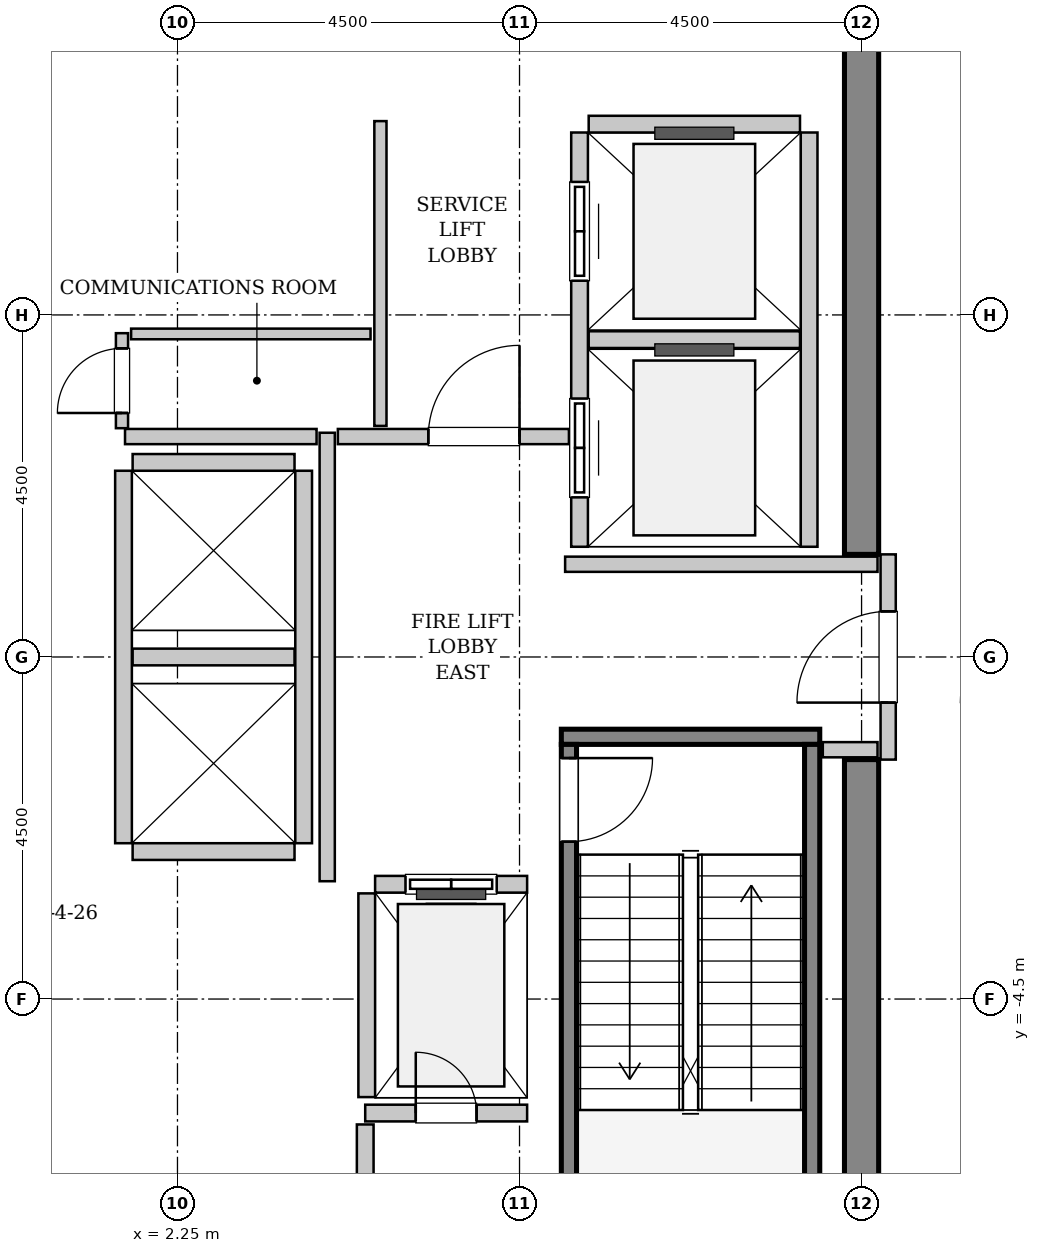
"""IFC4 building model, lengths in metres.
Left out: names, types, materials, properties, quantities, classifications, styles, units other than length and angle.
Written with IfcOpenShell. Run it as: python <this file> out.ifc"""

import sys

from ifc_helpers import new_model, si_unit, direction, frame, frame_2d, origin, place, context, subcontext, project, spatial, rectangle, extrude, source, transform, mapped, element, fill, save


model = new_model("IFC4")
c1 = context("Model", 3, precision=1e-05, world=origin(), true_north=direction((0.0, 1.0)))
c2 = subcontext(c1, "Body", "Model", "MODEL_VIEW")
j1 = project(units=[si_unit("LENGTHUNIT", "METRE"), si_unit("PLANEANGLEUNIT", "RADIAN")], contexts=[c1])
p1 = place(None, origin())
s1 = spatial("IfcSite", under=j1, at=p1, CompositionType="ELEMENT")
p2 = place(p1, origin())
s2 = spatial("IfcBuilding", under=s1, at=p2, CompositionType="ELEMENT")
p3 = place(p2, frame((0.0, 0.0, 317.8)))
s3 = spatial("IfcBuildingStorey", under=s2, at=p3, CompositionType="ELEMENT", Elevation=317.8)
m1 = source(origin(), c2, "Body", "SweptSolid", [
    extrude(rectangle(XDim=7.425, YDim=0.45, at=frame_2d((3.712, 0.0))), origin(), (0.0, 0.0, 1.0), 4.6),
])
for number, where, z_axis, x_axis in (
    (1, (11.25, -8.775, 0.0), (0.0, 0.0, 1.0), (0.0, 1.0, 0.0)),
    (2, (11.25, 1.35, 0.0), (0.0, 0.0, 1.0), (0.0, 1.0, 0.0)),
):
    element("IfcWall", number, at=place(p3, frame(where, z_axis=z_axis, x_axis=x_axis)), inside=s3, PredefinedType="SHEAR", context=c2, shape_type="MappedRepresentation", body=[
        mapped(m1, transform((0.0, 0.0, 0.0), x_axis=(1.0, 0.0, 0.0), y_axis=(0.0, 1.0, 0.0), z_axis=(0.0, 0.0, 1.0), scale=1.0)),
    ])
m2 = source(origin(), c2, "Body", "SweptSolid", [
    extrude(rectangle(XDim=3.4, YDim=0.2, at=frame_2d((1.7, 0.0))), origin(), (0.0, 0.0, 1.0), 4.6),
])
p4 = place(p3, frame((7.3, -1.05, 0.0), z_axis=(0.0, 0.0, 1.0), x_axis=(1.0, 0.0, 0.0)))
e3 = element("IfcWall", 3, at=p4, inside=s3, PredefinedType="SOLIDWALL", context=c2, shape_type="MappedRepresentation", body=[
    mapped(m2, transform((0.0, 0.0, 0.0), x_axis=(1.0, 0.0, 0.0), y_axis=(0.0, 1.0, 0.0), z_axis=(0.0, 0.0, 1.0), scale=1.0)),
])
m3 = source(origin(), c2, "Body", "SweptSolid", [
    extrude(rectangle(XDim=7.1, YDim=0.2, at=frame_2d((3.55, 0.0))), origin(), (0.0, 0.0, 1.0), 4.6),
])
p5 = place(p3, frame((7.4, -1.15, 0.0), z_axis=(0.0, 0.0, 1.0), x_axis=(0.0, -1.0, 0.0)))
e4 = element("IfcWall", 4, at=p5, inside=s3, PredefinedType="SOLIDWALL", context=c2, shape_type="MappedRepresentation", body=[
    mapped(m3, transform((0.0, 0.0, 0.0), x_axis=(1.0, 0.0, 0.0), y_axis=(0.0, 1.0, 0.0), z_axis=(0.0, 0.0, 1.0), scale=1.0)),
])
p6 = place(p5, frame((0.18, 0.0, 0.0)))
e5 = element("IfcOpeningElement", 5, at=p6, cuts=e4, PredefinedType="OPENING", context=c2, shape_type="SweptSolid", body=[
    extrude(rectangle(XDim=1.1, YDim=2.15, at=frame_2d((0.55, 1.075))), frame((0.0, 0.11, 0.0), z_axis=(0.0, -1.0, 0.0), x_axis=(1.0, 0.0, 0.0)), (0.0, 0.0, 1.0), 0.22),
])
p7 = place(p3, frame((10.6, -1.15, 0.0), z_axis=(0.0, 0.0, 1.0), x_axis=(0.0, -1.0, 0.0)))
e6 = element("IfcWall", 6, at=p7, inside=s3, PredefinedType="SOLIDWALL", context=c2, shape_type="MappedRepresentation", body=[
    mapped(m3, transform((0.0, 0.0, 0.0), x_axis=(1.0, 0.0, 0.0), y_axis=(0.0, 1.0, 0.0), z_axis=(0.0, 0.0, 1.0), scale=1.0)),
])
m4 = source(origin(), c2, "Body", "SweptSolid", [
    extrude(rectangle(XDim=2.0, YDim=0.22, at=frame_2d((1.0, 0.0))), origin(), (0.0, 0.0, 1.0), 4.335),
])
p8 = place(p3, frame((6.85, -2.99, 0.0), z_axis=(0.0, 0.0, 1.0), x_axis=(-1.0, 0.0, 0.0)))
e7 = element("IfcWall", 7, at=p8, inside=s3, PredefinedType="SOLIDWALL", context=c2, shape_type="MappedRepresentation", body=[
    mapped(m4, transform((0.0, 0.0, 0.0), x_axis=(1.0, 0.0, 0.0), y_axis=(0.0, 1.0, 0.0), z_axis=(0.0, 0.0, 1.0), scale=1.0)),
])
p9 = place(p8, frame((0.4, 0.0, 0.0)))
e8 = element("IfcOpeningElement", 8, at=p9, cuts=e7, PredefinedType="OPENING", context=c2, shape_type="SweptSolid", body=[
    extrude(rectangle(XDim=1.2, YDim=2.2, at=frame_2d((0.6, 1.1))), frame((0.0, 0.12, 0.0), z_axis=(0.0, -1.0, 0.0), x_axis=(1.0, 0.0, 0.0)), (0.0, 0.0, 1.0), 0.24),
])
m5 = source(origin(), c2, "Body", "SweptSolid", [
    extrude(rectangle(XDim=2.68, YDim=0.22, at=frame_2d((1.34, 0.0))), origin(), (0.0, 0.0, 1.0), 4.335),
])
p10 = place(p3, frame((4.74, -3.11, 0.0), z_axis=(0.0, 0.0, 1.0), x_axis=(0.0, -1.0, 0.0)))
e9 = element("IfcWall", 9, at=p10, inside=s3, PredefinedType="SOLIDWALL", context=c2, shape_type="MappedRepresentation", body=[
    mapped(m5, transform((0.0, 0.0, 0.0), x_axis=(1.0, 0.0, 0.0), y_axis=(0.0, 1.0, 0.0), z_axis=(0.0, 0.0, 1.0), scale=1.0)),
])
m6 = source(origin(), c2, "Body", "SweptSolid", [
    extrude(rectangle(XDim=5.45, YDim=0.22, at=frame_2d((2.725, 0.0))), origin(), (0.0, 0.0, 1.0), 4.335),
])
p11 = place(p3, frame((7.54, 6.9, 0.0), z_axis=(0.0, 0.0, 1.0), x_axis=(0.0, -1.0, 0.0)))
e10 = element("IfcWall", 10, at=p11, inside=s3, PredefinedType="SOLIDWALL", context=c2, shape_type="MappedRepresentation", body=[
    mapped(m6, transform((0.0, 0.0, 0.0), x_axis=(1.0, 0.0, 0.0), y_axis=(0.0, 1.0, 0.0), z_axis=(0.0, 0.0, 1.0), scale=1.0)),
])
p12 = place(p11, frame((3.5, 0.0, 0.0)))
e11 = element("IfcOpeningElement", 11, at=p12, cuts=e10, PredefinedType="OPENING", context=c2, shape_type="SweptSolid", body=[
    extrude(rectangle(XDim=1.3, YDim=2.3, at=frame_2d((0.65, 1.15))), frame((0.0, 0.12, 0.0), z_axis=(0.0, -1.0, 0.0), x_axis=(1.0, 0.0, 0.0)), (0.0, 0.0, 1.0), 0.24),
])
p13 = place(p11, frame((0.65, 0.0, 0.0)))
e12 = element("IfcOpeningElement", 12, at=p13, cuts=e10, PredefinedType="OPENING", context=c2, shape_type="SweptSolid", body=[
    extrude(rectangle(XDim=1.3, YDim=2.3, at=frame_2d((0.65, 1.15))), frame((0.0, 0.12, 0.0), z_axis=(0.0, -1.0, 0.0), x_axis=(1.0, 0.0, 0.0)), (0.0, 0.0, 1.0), 0.24),
])
p14 = place(p3, frame((10.56, 1.45, 0.0), z_axis=(0.0, 0.0, 1.0), x_axis=(0.0, 1.0, 0.0)))
e13 = element("IfcWall", 13, at=p14, inside=s3, PredefinedType="SOLIDWALL", context=c2, shape_type="MappedRepresentation", body=[
    mapped(m6, transform((0.0, 0.0, 0.0), x_axis=(1.0, 0.0, 0.0), y_axis=(0.0, 1.0, 0.0), z_axis=(0.0, 0.0, 1.0), scale=1.0)),
])
m7 = source(origin(), c2, "Body", "SweptSolid", [
    extrude(rectangle(XDim=2.78, YDim=0.22, at=frame_2d((1.39, 0.0))), origin(), (0.0, 0.0, 1.0), 4.335),
])
for number, where, z_axis, x_axis in (
    (14, (7.66, 4.175, 0.0), (0.0, 0.0, 1.0), (1.0, 0.0, 0.0)),
    (15, (10.44, 7.01, 0.0), (0.0, 0.0, 1.0), (-1.0, 0.0, 0.0)),
):
    element("IfcWall", number, at=place(p3, frame(where, z_axis=z_axis, x_axis=x_axis)), inside=s3, PredefinedType="SOLIDWALL", context=c2, shape_type="MappedRepresentation", body=[
        mapped(m7, transform((0.0, 0.0, 0.0), x_axis=(1.0, 0.0, 0.0), y_axis=(0.0, 1.0, 0.0), z_axis=(0.0, 0.0, 1.0), scale=1.0)),
    ])
m8 = source(origin(), c2, "Body", "SweptSolid", [
    extrude(rectangle(XDim=4.9, YDim=0.22, at=frame_2d((2.45, 0.0))), origin(), (0.0, 0.0, 1.0), 4.335),
])
for number, where, z_axis, x_axis in (
    (16, (1.54, 2.45, 0.0), (0.0, 0.0, 1.0), (0.0, -1.0, 0.0)),
    (17, (3.91, -2.45, 0.0), (0.0, 0.0, 1.0), (0.0, 1.0, 0.0)),
):
    element("IfcWall", number, at=place(p3, frame(where, z_axis=z_axis, x_axis=x_axis)), inside=s3, PredefinedType="SOLIDWALL", context=c2, shape_type="MappedRepresentation", body=[
        mapped(m8, transform((0.0, 0.0, 0.0), x_axis=(1.0, 0.0, 0.0), y_axis=(0.0, 1.0, 0.0), z_axis=(0.0, 0.0, 1.0), scale=1.0)),
    ])
m9 = source(origin(), c2, "Body", "SweptSolid", [
    extrude(rectangle(XDim=2.13, YDim=0.22, at=frame_2d((1.065, 0.0))), origin(), (0.0, 0.0, 1.0), 4.335),
])
for number, where, z_axis, x_axis in (
    (18, (1.66, -2.56, 0.0), (0.0, 0.0, 1.0), (1.0, 0.0, 0.0)),
    (19, (1.66, 0.0, 0.0), (0.0, 0.0, 1.0), (1.0, 0.0, 0.0)),
    (20, (3.79, 2.56, 0.0), (0.0, 0.0, 1.0), (-1.0, 0.0, 0.0)),
):
    element("IfcWall", number, at=place(p3, frame(where, z_axis=z_axis, x_axis=x_axis)), inside=s3, PredefinedType="SOLIDWALL", context=c2, shape_type="MappedRepresentation", body=[
        mapped(m9, transform((0.0, 0.0, 0.0), x_axis=(1.0, 0.0, 0.0), y_axis=(0.0, 1.0, 0.0), z_axis=(0.0, 0.0, 1.0), scale=1.0)),
    ])
p15 = place(p3, frame((4.72, -6.0, 0.0), z_axis=(0.0, 0.0, 1.0), x_axis=(1.0, 0.0, 0.0)))
e21 = element("IfcWall", 21, at=p15, inside=s3, PredefinedType="SOLIDWALL", context=c2, shape_type="MappedRepresentation", body=[
    mapped(m9, transform((0.0, 0.0, 0.0), x_axis=(1.0, 0.0, 0.0), y_axis=(0.0, 1.0, 0.0), z_axis=(0.0, 0.0, 1.0), scale=1.0)),
])
p16 = place(p15, frame((0.665, 0.0, 0.0)))
e22 = element("IfcOpeningElement", 22, at=p16, cuts=e21, PredefinedType="OPENING", context=c2, shape_type="SweptSolid", body=[
    extrude(rectangle(XDim=0.8, YDim=2.0, at=frame_2d((0.4, 1.0))), frame((0.0, 0.12, 0.0), z_axis=(0.0, -1.0, 0.0), x_axis=(1.0, 0.0, 0.0)), (0.0, 0.0, 1.0), 0.24),
])
m10 = source(origin(), c2, "Body", "SweptSolid", [
    extrude(rectangle(XDim=2.1, YDim=0.22, at=frame_2d((1.05, 0.0))), origin(), (0.0, 0.0, 1.0), 4.335),
])
p17 = place(p3, frame((4.72, -8.25, 0.0), z_axis=(0.0, 0.0, 1.0), x_axis=(0.0, 1.0, 0.0)))
e23 = element("IfcWall", 23, at=p17, inside=s3, PredefinedType="SOLIDWALL", context=c2, shape_type="MappedRepresentation", body=[
    mapped(m10, transform((0.0, 0.0, 0.0), x_axis=(1.0, 0.0, 0.0), y_axis=(0.0, 1.0, 0.0), z_axis=(0.0, 0.0, 1.0), scale=1.0)),
])
m11 = source(origin(), c2, "Body", "SweptSolid", [
    extrude(rectangle(XDim=2.7, YDim=0.2, at=frame_2d((1.35, 0.0))), origin(), (0.0, 0.0, 1.0), 3.425),
])
p18 = place(p3, frame((11.6, -1.35, 0.0), z_axis=(0.0, 0.0, 1.0), x_axis=(0.0, 1.0, 0.0)))
e24 = element("IfcWall", 24, at=p18, inside=s3, PredefinedType="PARTITIONING", context=c2, shape_type="MappedRepresentation", body=[
    mapped(m11, transform((0.0, 0.0, 0.0), x_axis=(1.0, 0.0, 0.0), y_axis=(0.0, 1.0, 0.0), z_axis=(0.0, 0.0, 1.0), scale=1.0)),
])
p19 = place(p18, frame((0.75, 0.0, 0.0)))
e25 = element("IfcOpeningElement", 25, at=p19, cuts=e24, PredefinedType="OPENING", context=c2, shape_type="SweptSolid", body=[
    extrude(rectangle(XDim=1.2, YDim=2.15, at=frame_2d((0.6, 1.075))), frame((0.0, 0.11, 0.0), z_axis=(0.0, -1.0, 0.0), x_axis=(1.0, 0.0, 0.0)), (0.0, 0.0, 1.0), 0.22),
])
m12 = source(origin(), c2, "Body", "SweptSolid", [
    extrude(rectangle(XDim=5.9, YDim=0.2, at=frame_2d((2.95, 0.0))), origin(), (0.0, 0.0, 1.0), 4.335),
])
p20 = place(p3, frame((4.22, -2.95, 0.0), z_axis=(0.0, 0.0, 1.0), x_axis=(0.0, 1.0, 0.0)))
e26 = element("IfcWall", 26, at=p20, inside=s3, PredefinedType="PARTITIONING", context=c2, shape_type="MappedRepresentation", body=[
    mapped(m12, transform((0.0, 0.0, 0.0), x_axis=(1.0, 0.0, 0.0), y_axis=(0.0, 1.0, 0.0), z_axis=(0.0, 0.0, 1.0), scale=1.0)),
])
m13 = source(origin(), c2, "Body", "SweptSolid", [
    extrude(rectangle(XDim=2.52, YDim=0.2, at=frame_2d((1.26, 0.0))), origin(), (0.0, 0.0, 1.0), 4.335),
])
p21 = place(p3, frame((1.56, 2.9, 0.0), z_axis=(0.0, 0.0, 1.0), x_axis=(1.0, 0.0, 0.0)))
e27 = element("IfcWall", 27, at=p21, inside=s3, PredefinedType="PARTITIONING", context=c2, shape_type="MappedRepresentation", body=[
    mapped(m13, transform((0.0, 0.0, 0.0), x_axis=(1.0, 0.0, 0.0), y_axis=(0.0, 1.0, 0.0), z_axis=(0.0, 0.0, 1.0), scale=1.0)),
])
m14 = source(origin(), c2, "Body", "SweptSolid", [
    extrude(rectangle(XDim=3.04, YDim=0.2, at=frame_2d((1.52, 0.0))), origin(), (0.0, 0.0, 1.0), 4.335),
])
p22 = place(p3, frame((4.36, 2.9, 0.0), z_axis=(0.0, 0.0, 1.0), x_axis=(1.0, 0.0, 0.0)))
e28 = element("IfcWall", 28, at=p22, inside=s3, PredefinedType="PARTITIONING", context=c2, shape_type="MappedRepresentation", body=[
    mapped(m14, transform((0.0, 0.0, 0.0), x_axis=(1.0, 0.0, 0.0), y_axis=(0.0, 1.0, 0.0), z_axis=(0.0, 0.0, 1.0), scale=1.0)),
])
p23 = place(p22, frame((1.19, 0.0, 0.0)))
e29 = element("IfcOpeningElement", 29, at=p23, cuts=e28, PredefinedType="OPENING", context=c2, shape_type="SweptSolid", body=[
    extrude(rectangle(XDim=1.2, YDim=2.15, at=frame_2d((0.6, 1.075))), frame((0.0, 0.11, 0.0), z_axis=(0.0, -1.0, 0.0), x_axis=(1.0, 0.0, 0.0)), (0.0, 0.0, 1.0), 0.22),
])
m15 = source(origin(), c2, "Body", "SweptSolid", [
    extrude(rectangle(XDim=4.11, YDim=0.2, at=frame_2d((2.055, 0.0))), origin(), (0.0, 0.0, 1.0), 4.335),
])
p24 = place(p3, frame((7.35, 1.22, 0.0), z_axis=(0.0, 0.0, 1.0), x_axis=(1.0, 0.0, 0.0)))
e30 = element("IfcWall", 30, at=p24, inside=s3, PredefinedType="PARTITIONING", context=c2, shape_type="MappedRepresentation", body=[
    mapped(m15, transform((0.0, 0.0, 0.0), x_axis=(1.0, 0.0, 0.0), y_axis=(0.0, 1.0, 0.0), z_axis=(0.0, 0.0, 1.0), scale=1.0)),
])
m16 = source(origin(), c2, "Body", "SweptSolid", [
    extrude(rectangle(XDim=0.72, YDim=0.2, at=frame_2d((0.36, 0.0))), origin(), (0.0, 0.0, 1.0), 4.335),
])
p25 = place(p3, frame((10.74, -1.22, 0.0), z_axis=(0.0, 0.0, 1.0), x_axis=(1.0, 0.0, 0.0)))
e31 = element("IfcWall", 31, at=p25, inside=s3, PredefinedType="PARTITIONING", context=c2, shape_type="MappedRepresentation", body=[
    mapped(m16, transform((0.0, 0.0, 0.0), x_axis=(1.0, 0.0, 0.0), y_axis=(0.0, 1.0, 0.0), z_axis=(0.0, 0.0, 1.0), scale=1.0)),
])
m17 = source(origin(), c2, "Body", "SweptSolid", [
    extrude(rectangle(XDim=4.01, YDim=0.16, at=frame_2d((2.005, 0.0))), origin(), (0.0, 0.0, 1.0), 4.335),
])
p26 = place(p3, frame((4.92, 3.04, 0.0), z_axis=(0.0, 0.0, 1.0), x_axis=(0.0, 1.0, 0.0)))
e32 = element("IfcWall", 32, at=p26, inside=s3, PredefinedType="PARTITIONING", context=c2, shape_type="MappedRepresentation", body=[
    mapped(m17, transform((0.0, 0.0, 0.0), x_axis=(1.0, 0.0, 0.0), y_axis=(0.0, 1.0, 0.0), z_axis=(0.0, 0.0, 1.0), scale=1.0)),
])
m18 = source(origin(), c2, "Body", "SweptSolid", [
    extrude(rectangle(XDim=1.25, YDim=0.16, at=frame_2d((0.625, 0.0))), origin(), (0.0, 0.0, 1.0), 4.335),
])
p27 = place(p3, frame((1.52, 3.01, 0.0), z_axis=(0.0, 0.0, 1.0), x_axis=(0.0, 1.0, 0.0)))
e33 = element("IfcWall", 33, at=p27, inside=s3, PredefinedType="PARTITIONING", context=c2, shape_type="MappedRepresentation", body=[
    mapped(m18, transform((0.0, 0.0, 0.0), x_axis=(1.0, 0.0, 0.0), y_axis=(0.0, 1.0, 0.0), z_axis=(0.0, 0.0, 1.0), scale=1.0)),
])
p28 = place(p27, frame((0.2, 0.0, 0.0)))
e34 = element("IfcOpeningElement", 34, at=p28, cuts=e33, PredefinedType="OPENING", context=c2, shape_type="SweptSolid", body=[
    extrude(rectangle(XDim=0.85, YDim=2.1, at=frame_2d((0.425, 1.05))), frame((0.0, 0.09, 0.0), z_axis=(0.0, -1.0, 0.0), x_axis=(1.0, 0.0, 0.0)), (0.0, 0.0, 1.0), 0.18),
])
m19 = source(origin(), c2, "Body", "SweptSolid", [
    extrude(rectangle(XDim=3.15, YDim=0.14, at=frame_2d((1.575, 0.0))), origin(), (0.0, 0.0, 1.0), 4.335),
])
p29 = place(p3, frame((1.64, 4.25, 0.0), z_axis=(0.0, 0.0, 1.0), x_axis=(1.0, 0.0, 0.0)))
e35 = element("IfcWall", 35, at=p29, inside=s3, PredefinedType="PARTITIONING", context=c2, shape_type="MappedRepresentation", body=[
    mapped(m19, transform((0.0, 0.0, 0.0), x_axis=(1.0, 0.0, 0.0), y_axis=(0.0, 1.0, 0.0), z_axis=(0.0, 0.0, 1.0), scale=1.0)),
])
m20 = source(origin(), c2, "Body", "SweptSolid", [
    extrude(rectangle(XDim=1.1, YDim=2.15, at=frame_2d((0.55, 1.075))), frame((0.0, 0.025, 0.0), z_axis=(0.0, -1.0, 0.0), x_axis=(1.0, 0.0, 0.0)), (0.0, 0.0, 1.0), 0.05),
])
p30 = place(p6, origin())
e36 = element("IfcDoor", 36, at=p30, inside=s3, OperationType="SINGLE_SWING_LEFT", PredefinedType="DOOR", context=c2, shape_type="MappedRepresentation", body=[
    mapped(m20, transform((0.0, 0.0, 0.0), x_axis=(1.0, 0.0, 0.0), y_axis=(0.0, 1.0, 0.0), z_axis=(0.0, 0.0, 1.0), scale=1.0)),
])
fill(e5, e36)
m21 = source(origin(), c2, "Body", "SweptSolid", [
    extrude(rectangle(XDim=1.2, YDim=2.2, at=frame_2d((0.6, 1.1))), frame((0.0, 0.025, 0.0), z_axis=(0.0, -1.0, 0.0), x_axis=(1.0, 0.0, 0.0)), (0.0, 0.0, 1.0), 0.05),
])
p31 = place(p9, origin())
e37 = element("IfcDoor", 37, at=p31, inside=s3, OperationType="SLIDING_TO_LEFT", PredefinedType="DOOR", context=c2, shape_type="MappedRepresentation", body=[
    mapped(m21, transform((0.0, 0.0, 0.0), x_axis=(1.0, 0.0, 0.0), y_axis=(0.0, 1.0, 0.0), z_axis=(0.0, 0.0, 1.0), scale=1.0)),
])
fill(e8, e37)
m22 = source(origin(), c2, "Body", "SweptSolid", [
    extrude(rectangle(XDim=1.3, YDim=2.3, at=frame_2d((0.65, 1.15))), frame((0.0, 0.025, 0.0), z_axis=(0.0, -1.0, 0.0), x_axis=(1.0, 0.0, 0.0)), (0.0, 0.0, 1.0), 0.05),
])
p32 = place(p12, origin())
e38 = element("IfcDoor", 38, at=p32, inside=s3, OperationType="SLIDING_TO_RIGHT", PredefinedType="DOOR", context=c2, shape_type="MappedRepresentation", body=[
    mapped(m22, transform((0.0, 0.0, 0.0), x_axis=(1.0, 0.0, 0.0), y_axis=(0.0, 1.0, 0.0), z_axis=(0.0, 0.0, 1.0), scale=1.0)),
])
fill(e11, e38)
p33 = place(p13, origin())
e39 = element("IfcDoor", 39, at=p33, inside=s3, OperationType="SLIDING_TO_RIGHT", PredefinedType="DOOR", context=c2, shape_type="MappedRepresentation", body=[
    mapped(m22, transform((0.0, 0.0, 0.0), x_axis=(1.0, 0.0, 0.0), y_axis=(0.0, 1.0, 0.0), z_axis=(0.0, 0.0, 1.0), scale=1.0)),
])
fill(e12, e39)
m23 = source(origin(), c2, "Body", "SweptSolid", [
    extrude(rectangle(XDim=0.8, YDim=2.0, at=frame_2d((0.4, 1.0))), frame((0.0, 0.025, 0.0), z_axis=(0.0, -1.0, 0.0), x_axis=(1.0, 0.0, 0.0)), (0.0, 0.0, 1.0), 0.05),
])
p34 = place(p16, origin())
e40 = element("IfcDoor", 40, at=p34, inside=s3, OperationType="SINGLE_SWING_LEFT", PredefinedType="TRAPDOOR", context=c2, shape_type="MappedRepresentation", body=[
    mapped(m23, transform((0.0, 0.0, 0.0), x_axis=(1.0, 0.0, 0.0), y_axis=(0.0, 1.0, 0.0), z_axis=(0.0, 0.0, 1.0), scale=1.0)),
])
fill(e22, e40)
m24 = source(origin(), c2, "Body", "SweptSolid", [
    extrude(rectangle(XDim=1.2, YDim=2.15, at=frame_2d((0.6, 1.075))), frame((0.0, 0.025, 0.0), z_axis=(0.0, -1.0, 0.0), x_axis=(1.0, 0.0, 0.0)), (0.0, 0.0, 1.0), 0.05),
])
p35 = place(p19, origin())
e41 = element("IfcDoor", 41, at=p35, inside=s3, OperationType="SINGLE_SWING_LEFT", PredefinedType="DOOR", context=c2, shape_type="MappedRepresentation", body=[
    mapped(m24, transform((0.0, 0.0, 0.0), x_axis=(1.0, 0.0, 0.0), y_axis=(0.0, 1.0, 0.0), z_axis=(0.0, 0.0, 1.0), scale=1.0)),
])
fill(e25, e41)
p36 = place(p23, origin())
e42 = element("IfcDoor", 42, at=p36, inside=s3, OperationType="SINGLE_SWING_RIGHT", PredefinedType="DOOR", context=c2, shape_type="MappedRepresentation", body=[
    mapped(m24, transform((0.0, 0.0, 0.0), x_axis=(1.0, 0.0, 0.0), y_axis=(0.0, 1.0, 0.0), z_axis=(0.0, 0.0, 1.0), scale=1.0)),
])
fill(e29, e42)
m25 = source(origin(), c2, "Body", "SweptSolid", [
    extrude(rectangle(XDim=0.85, YDim=2.1, at=frame_2d((0.425, 1.05))), frame((0.0, 0.025, 0.0), z_axis=(0.0, -1.0, 0.0), x_axis=(1.0, 0.0, 0.0)), (0.0, 0.0, 1.0), 0.05),
])
p37 = place(p28, origin())
e43 = element("IfcDoor", 43, at=p37, inside=s3, OperationType="SINGLE_SWING_LEFT", PredefinedType="DOOR", context=c2, shape_type="MappedRepresentation", body=[
    mapped(m25, transform((0.0, 0.0, 0.0), x_axis=(1.0, 0.0, 0.0), y_axis=(0.0, 1.0, 0.0), z_axis=(0.0, 0.0, 1.0), scale=1.0)),
])
fill(e34, e43)
save(model, sys.argv[1])
